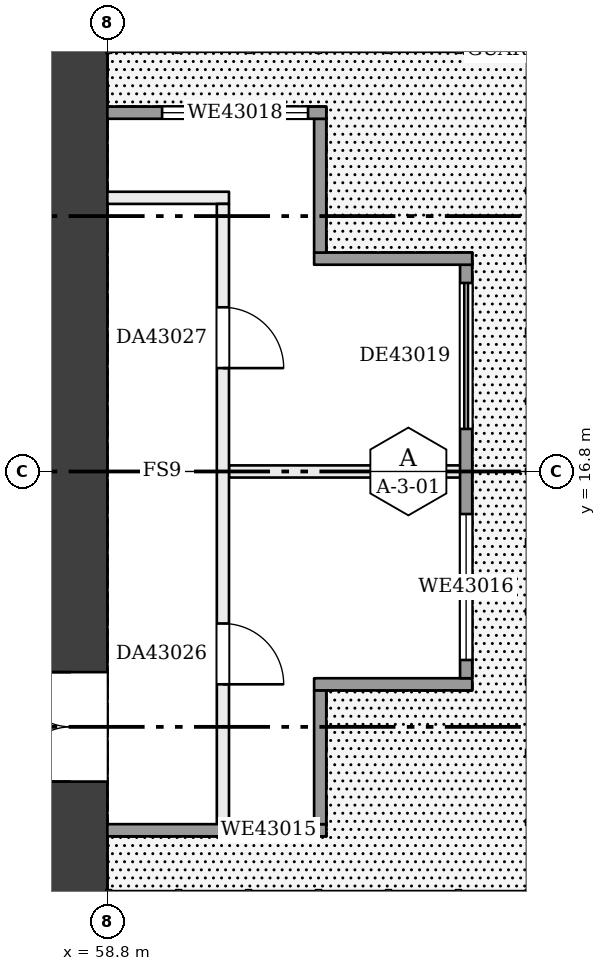
"""IFC4 building model, lengths in metres.
Left out: names, types, materials, properties, quantities, classifications, styles, units other than length and angle.
Written with IfcOpenShell. Run it as: python <this file> out.ifc"""

import sys

from ifc_helpers import new_model, si_unit, direction, frame, frame_2d, origin, place, context, subcontext, project, spatial, rectangle, extrude, element, fill, save


model = new_model("IFC4")
c1 = context("Model", 3, precision=1e-05, world=origin(), true_north=direction((0.0, 1.0)))
c2 = subcontext(c1, "Body", "Model", "MODEL_VIEW")
j1 = project(units=[si_unit("LENGTHUNIT", "METRE"), si_unit("PLANEANGLEUNIT", "RADIAN")], contexts=[c1])
p1 = place(None, origin())
s1 = spatial("IfcSite", under=j1, at=p1, CompositionType="ELEMENT")
p2 = place(p1, origin())
s2 = spatial("IfcBuilding", under=s1, at=p2, CompositionType="ELEMENT")
p3 = place(p2, frame((0.0, 0.0, 168.7)))
s3 = spatial("IfcBuildingStorey", under=s2, at=p3, CompositionType="ELEMENT", Elevation=168.7)
p4 = place(p3, frame((58.2, 9.6, 0.0), z_axis=(0.0, 0.0, 1.0), x_axis=(0.0, 1.0, 0.0)))
e1 = element("IfcWall", 1, at=p4, inside=s3, PredefinedType="SHEAR", context=c2, shape_type="SweptSolid", body=[
    extrude(rectangle(XDim=14.4, YDim=1.2, at=frame_2d((7.2, 0.0))), origin(), (0.0, 0.0, 1.0), 3.22),
])
p5 = place(p4, frame((2.1, 0.0, 0.0)))
e2 = element("IfcOpeningElement", 2, at=p5, cuts=e1, PredefinedType="OPENING", context=c2, shape_type="SweptSolid", body=[
    extrude(rectangle(XDim=1.8, YDim=2.1, at=frame_2d((0.9, 1.05))), frame((0.0, 0.61, 0.0), z_axis=(0.0, -1.0, 0.0), x_axis=(1.0, 0.0, 0.0)), (0.0, 0.0, 1.0), 1.22),
])
p6 = place(p3, frame((60.8, 16.8, 0.0), z_axis=(0.0, 0.0, 1.0), x_axis=(1.0, 0.0, 0.0)))
e3 = element("IfcWall", 3, at=p6, inside=s3, PredefinedType="PARTITIONING", context=c2, shape_type="SweptSolid", body=[
    extrude(rectangle(XDim=3.9, YDim=0.2, at=frame_2d((1.95, 0.0))), origin(), (0.0, 0.0, 1.0), 3.22),
])
p7 = place(p3, frame((58.8, 21.3, 0.0), z_axis=(0.0, 0.0, 1.0), x_axis=(1.0, 0.0, 0.0)))
e4 = element("IfcWall", 4, at=p7, inside=s3, PredefinedType="PARTITIONING", context=c2, shape_type="SweptSolid", body=[
    extrude(rectangle(XDim=2.0, YDim=0.2, at=frame_2d((1.0, 0.0))), origin(), (0.0, 0.0, 1.0), 3.22),
])
p8 = place(p3, frame((60.7, 10.9, 0.0), z_axis=(0.0, 0.0, 1.0), x_axis=(0.0, 1.0, 0.0)))
e5 = element("IfcWall", 5, at=p8, inside=s3, PredefinedType="PARTITIONING", context=c2, shape_type="SweptSolid", body=[
    extrude(rectangle(XDim=10.3, YDim=0.2, at=frame_2d((5.15, 0.0))), origin(), (0.0, 0.0, 1.0), 3.22),
])
p9 = place(p8, frame((2.4, 0.0, 0.0)))
e6 = element("IfcOpeningElement", 6, at=p9, cuts=e5, PredefinedType="OPENING", context=c2, shape_type="SweptSolid", body=[
    extrude(rectangle(XDim=1.0, YDim=2.1, at=frame_2d((0.5, 1.05))), frame((0.0, 0.11, 0.0), z_axis=(0.0, -1.0, 0.0), x_axis=(1.0, 0.0, 0.0)), (0.0, 0.0, 1.0), 0.22),
])
p10 = place(p8, frame((7.6, 0.0, 0.0)))
e7 = element("IfcOpeningElement", 7, at=p10, cuts=e5, PredefinedType="OPENING", context=c2, shape_type="SweptSolid", body=[
    extrude(rectangle(XDim=1.0, YDim=2.1, at=frame_2d((0.5, 1.05))), frame((0.0, 0.11, 0.0), z_axis=(0.0, -1.0, 0.0), x_axis=(1.0, 0.0, 0.0)), (0.0, 0.0, 1.0), 0.22),
])
p11 = place(p3, frame((58.8, 10.9, 0.0), z_axis=(0.0, 0.0, 1.0), x_axis=(1.0, 0.0, 0.0)))
e8 = element("IfcWall", 8, at=p11, inside=s3, PredefinedType="SOLIDWALL", context=c2, shape_type="SweptSolid", body=[
    extrude(rectangle(XDim=3.6, YDim=0.2, at=frame_2d((1.8, 0.0))), origin(), (0.0, 0.0, 1.0), 3.22),
])
p12 = place(p11, frame((2.0, 0.0, 0.9)))
e9 = element("IfcOpeningElement", 9, at=p12, cuts=e8, PredefinedType="OPENING", context=c2, shape_type="SweptSolid", body=[
    extrude(rectangle(XDim=1.3, YDim=1.5, at=frame_2d((0.65, 0.75))), frame((0.0, 0.11, 0.0), z_axis=(0.0, -1.0, 0.0), x_axis=(1.0, 0.0, 0.0)), (0.0, 0.0, 1.0), 0.22),
])
p13 = place(p3, frame((62.3, 11.0, 0.0), z_axis=(0.0, 0.0, 1.0), x_axis=(0.0, 1.0, 0.0)))
e10 = element("IfcWall", 10, at=p13, inside=s3, PredefinedType="SOLIDWALL", context=c2, shape_type="SweptSolid", body=[
    extrude(rectangle(XDim=2.2, YDim=0.2, at=frame_2d((1.1, 0.0))), origin(), (0.0, 0.0, 1.0), 3.22),
])
p14 = place(p3, frame((62.2, 13.3, 0.0), z_axis=(0.0, 0.0, 1.0), x_axis=(1.0, 0.0, 0.0)))
e11 = element("IfcWall", 11, at=p14, inside=s3, PredefinedType="SOLIDWALL", context=c2, shape_type="SweptSolid", body=[
    extrude(rectangle(XDim=2.6, YDim=0.2, at=frame_2d((1.3, 0.0))), origin(), (0.0, 0.0, 1.0), 3.22),
])
p15 = place(p3, frame((64.7, 13.4, 0.0), z_axis=(0.0, 0.0, 1.0), x_axis=(0.0, 1.0, 0.0)))
e12 = element("IfcWall", 12, at=p15, inside=s3, PredefinedType="SOLIDWALL", context=c2, shape_type="SweptSolid", body=[
    extrude(rectangle(XDim=6.8, YDim=0.2, at=frame_2d((3.4, 0.0))), origin(), (0.0, 0.0, 1.0), 3.22),
])
p16 = place(p15, frame((0.3, 0.0, 0.9)))
e13 = element("IfcOpeningElement", 13, at=p16, cuts=e12, PredefinedType="OPENING", context=c2, shape_type="SweptSolid", body=[
    extrude(rectangle(XDim=2.4, YDim=1.5, at=frame_2d((1.2, 0.75))), frame((0.0, 0.11, 0.0), z_axis=(0.0, -1.0, 0.0), x_axis=(1.0, 0.0, 0.0)), (0.0, 0.0, 1.0), 0.22),
])
p17 = place(p15, frame((4.1, 0.0, 0.0)))
e14 = element("IfcOpeningElement", 14, at=p17, cuts=e12, PredefinedType="OPENING", context=c2, shape_type="SweptSolid", body=[
    extrude(rectangle(XDim=2.4, YDim=2.2, at=frame_2d((1.2, 1.1))), frame((0.0, 0.11, 0.0), z_axis=(0.0, -1.0, 0.0), x_axis=(1.0, 0.0, 0.0)), (0.0, 0.0, 1.0), 0.22),
])
p18 = place(p3, frame((64.8, 20.3, 0.0), z_axis=(0.0, 0.0, 1.0), x_axis=(-1.0, 0.0, 0.0)))
e15 = element("IfcWall", 15, at=p18, inside=s3, PredefinedType="SOLIDWALL", context=c2, shape_type="SweptSolid", body=[
    extrude(rectangle(XDim=2.6, YDim=0.2, at=frame_2d((1.3, 0.0))), origin(), (0.0, 0.0, 1.0), 3.22),
])
p19 = place(p3, frame((62.3, 20.4, 0.0), z_axis=(0.0, 0.0, 1.0), x_axis=(0.0, 1.0, 0.0)))
e16 = element("IfcWall", 16, at=p19, inside=s3, PredefinedType="SOLIDWALL", context=c2, shape_type="SweptSolid", body=[
    extrude(rectangle(XDim=2.2, YDim=0.2, at=frame_2d((1.1, 0.0))), origin(), (0.0, 0.0, 1.0), 3.22),
])
p20 = place(p3, frame((62.4, 22.7, 0.0), z_axis=(0.0, 0.0, 1.0), x_axis=(-1.0, 0.0, 0.0)))
e17 = element("IfcWall", 17, at=p20, inside=s3, PredefinedType="SOLIDWALL", context=c2, shape_type="SweptSolid", body=[
    extrude(rectangle(XDim=3.6, YDim=0.2, at=frame_2d((1.8, 0.0))), origin(), (0.0, 0.0, 1.0), 3.22),
])
p21 = place(p20, frame((0.3, 0.0, 0.9)))
e18 = element("IfcOpeningElement", 18, at=p21, cuts=e17, PredefinedType="OPENING", context=c2, shape_type="SweptSolid", body=[
    extrude(rectangle(XDim=2.4, YDim=1.5, at=frame_2d((1.2, 0.75))), frame((0.0, 0.11, 0.0), z_axis=(0.0, -1.0, 0.0), x_axis=(1.0, 0.0, 0.0)), (0.0, 0.0, 1.0), 0.22),
])
p22 = place(p5, origin())
e19 = element("IfcDoor", 19, at=p22, inside=s3, OperationType="DOUBLE_DOOR_SINGLE_SWING", PredefinedType="DOOR", context=c2, shape_type="SweptSolid", body=[
    extrude(rectangle(XDim=1.8, YDim=2.1, at=frame_2d((0.9, 1.05))), frame((0.0, 0.025, 0.0), z_axis=(0.0, -1.0, 0.0), x_axis=(1.0, 0.0, 0.0)), (0.0, 0.0, 1.0), 0.05),
])
fill(e2, e19)
p23 = place(p9, frame((1.0, 0.0, 0.0), z_axis=(0.0, 0.0, 1.0), x_axis=(-1.0, 0.0, 0.0)))
e20 = element("IfcDoor", 20, at=p23, inside=s3, OperationType="SINGLE_SWING_RIGHT", PredefinedType="DOOR", context=c2, shape_type="SweptSolid", body=[
    extrude(rectangle(XDim=1.0, YDim=2.1, at=frame_2d((0.5, 1.05))), frame((0.0, 0.025, 0.0), z_axis=(0.0, -1.0, 0.0), x_axis=(1.0, 0.0, 0.0)), (0.0, 0.0, 1.0), 0.05),
])
fill(e6, e20)
p24 = place(p10, frame((1.0, 0.0, 0.0), z_axis=(0.0, 0.0, 1.0), x_axis=(-1.0, 0.0, 0.0)))
e21 = element("IfcDoor", 21, at=p24, inside=s3, OperationType="SINGLE_SWING_RIGHT", PredefinedType="DOOR", context=c2, shape_type="SweptSolid", body=[
    extrude(rectangle(XDim=1.0, YDim=2.1, at=frame_2d((0.5, 1.05))), frame((0.0, 0.025, 0.0), z_axis=(0.0, -1.0, 0.0), x_axis=(1.0, 0.0, 0.0)), (0.0, 0.0, 1.0), 0.05),
])
fill(e7, e21)
p25 = place(p12, origin())
e22 = element("IfcWindow", 22, at=p25, inside=s3, PartitioningType="SINGLE_PANEL", PredefinedType="WINDOW", context=c2, shape_type="SweptSolid", body=[
    extrude(rectangle(XDim=1.3, YDim=1.5, at=frame_2d((0.65, 0.75))), frame((0.0, 0.03, 0.0), z_axis=(0.0, -1.0, 0.0), x_axis=(1.0, 0.0, 0.0)), (0.0, 0.0, 1.0), 0.06),
])
fill(e9, e22)
p26 = place(p16, origin())
e23 = element("IfcWindow", 23, at=p26, inside=s3, PartitioningType="SINGLE_PANEL", PredefinedType="WINDOW", context=c2, shape_type="SweptSolid", body=[
    extrude(rectangle(XDim=2.4, YDim=1.5, at=frame_2d((1.2, 0.75))), frame((0.0, 0.03, 0.0), z_axis=(0.0, -1.0, 0.0), x_axis=(1.0, 0.0, 0.0)), (0.0, 0.0, 1.0), 0.06),
])
fill(e13, e23)
p27 = place(p21, origin())
e24 = element("IfcWindow", 24, at=p27, inside=s3, PartitioningType="SINGLE_PANEL", PredefinedType="WINDOW", context=c2, shape_type="SweptSolid", body=[
    extrude(rectangle(XDim=2.4, YDim=1.5, at=frame_2d((1.2, 0.75))), frame((0.0, 0.03, 0.0), z_axis=(0.0, -1.0, 0.0), x_axis=(1.0, 0.0, 0.0)), (0.0, 0.0, 1.0), 0.06),
])
fill(e18, e24)
p28 = place(p17, origin())
e25 = element("IfcDoor", 25, at=p28, inside=s3, OperationType="DOUBLE_DOOR_SLIDING", PredefinedType="DOOR", context=c2, shape_type="SweptSolid", body=[
    extrude(rectangle(XDim=2.4, YDim=2.2, at=frame_2d((1.2, 1.1))), frame((0.0, 0.025, 0.0), z_axis=(0.0, -1.0, 0.0), x_axis=(1.0, 0.0, 0.0)), (0.0, 0.0, 1.0), 0.05),
])
fill(e14, e25)
save(model, sys.argv[1])
